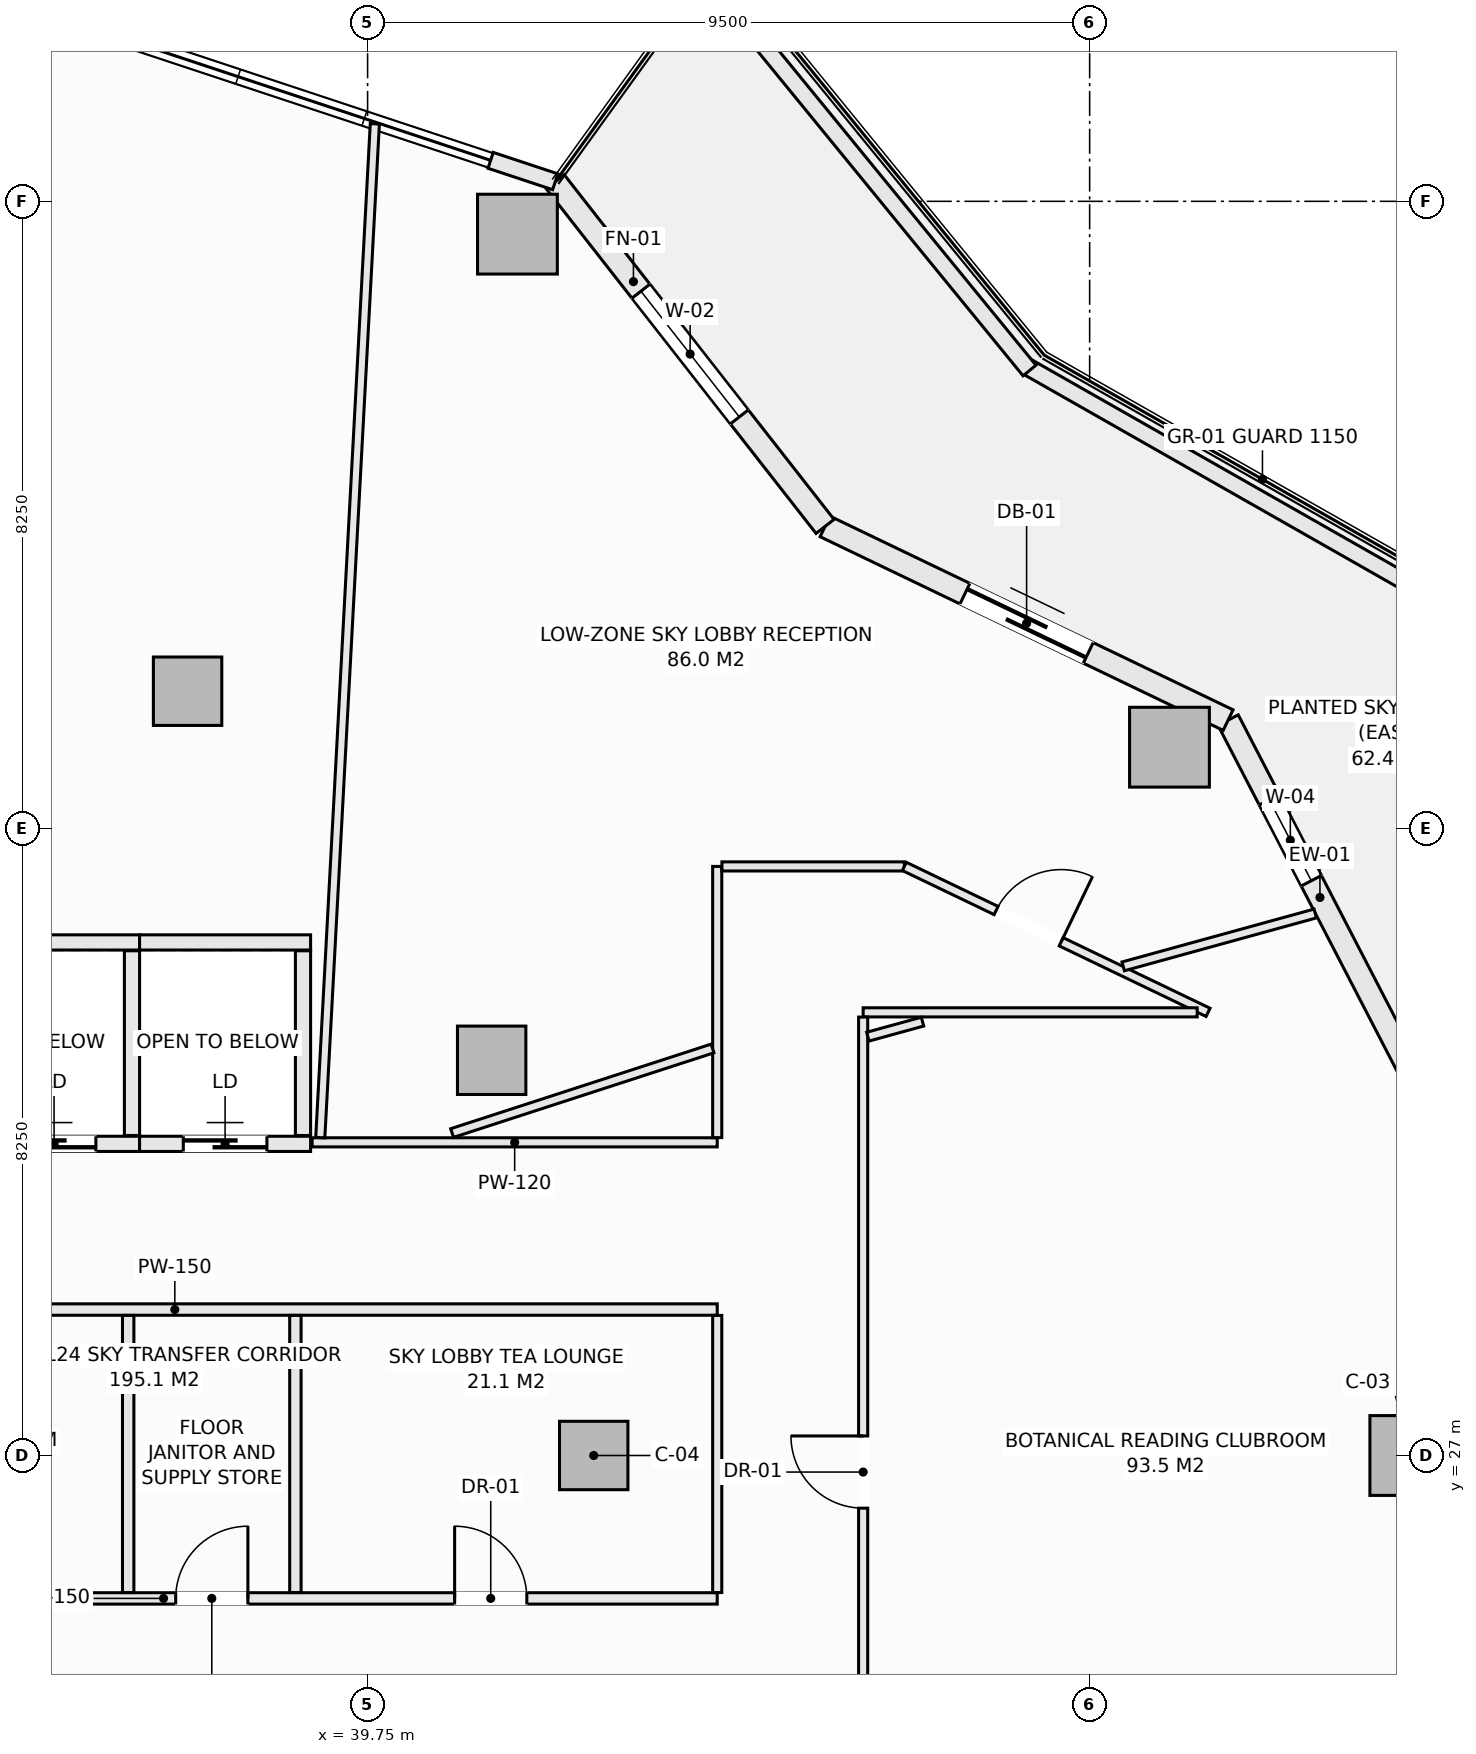
"""IFC4 building model, lengths in metres.
Left out: names, types, materials, properties, quantities, classifications, styles, units other than length and angle.
Written with IfcOpenShell. Run it as: python <this file> out.ifc"""

import sys

from ifc_helpers import new_model, si_unit, direction, frame, frame_2d, origin, origin_2d, place, context, subcontext, project, spatial, rectangle, extrude, element, fill, save


model = new_model("IFC4")
c1 = context("Model", 3, precision=1e-05, world=origin(), true_north=direction((0.0, 1.0)))
c2 = subcontext(c1, "Body", "Model", "MODEL_VIEW")
j1 = project(units=[si_unit("LENGTHUNIT", "METRE"), si_unit("PLANEANGLEUNIT", "RADIAN")], contexts=[c1])
p1 = place(None, origin())
s1 = spatial("IfcSite", under=j1, at=p1, CompositionType="ELEMENT")
p2 = place(p1, origin())
s2 = spatial("IfcBuilding", under=s1, at=p2, CompositionType="ELEMENT")
p3 = place(p2, frame((0.0, 0.0, 100.8)))
s3 = spatial("IfcBuildingStorey", under=s2, at=p3, CompositionType="ELEMENT", Elevation=100.8)
for number, where, z_axis, x_axis in (
    (1, (53.462, 27.0, -0.28), (0.0, 0.0, 1.0), (1.0, 0.0, 0.0)),
    (2, (50.3, 36.319, -0.28), (0.0, 0.0, 1.0), (1.0, 0.0, 0.0)),
    (3, (41.721, 43.068, -0.28), (0.0, 0.0, 1.0), (1.0, 0.0, 0.0)),
):
    element("IfcColumn", number, at=place(p3, frame(where, z_axis=z_axis, x_axis=x_axis)), inside=s3, PredefinedType="COLUMN", context=c2, shape_type="SweptSolid", body=[
        extrude(rectangle(XDim=1.05, YDim=1.05, at=origin_2d()), origin(), (0.0, 0.0, 1.0), 4.51),
    ])
for number, where, z_axis, x_axis in (
    (4, (42.725, 27.0, -0.28), (0.0, 0.0, 1.0), (1.0, 0.0, 0.0)),
    (5, (41.382, 32.199, -0.28), (0.0, 0.0, 1.0), (1.0, 0.0, 0.0)),
    (6, (37.382, 37.055, -0.28), (0.0, 0.0, 1.0), (1.0, 0.0, 0.0)),
):
    element("IfcColumn", number, at=place(p3, frame(where, z_axis=z_axis, x_axis=x_axis)), inside=s3, PredefinedType="COLUMN", context=c2, shape_type="SweptSolid", body=[
        extrude(rectangle(XDim=0.9, YDim=0.9, at=origin_2d()), origin(), (0.0, 0.0, 1.0), 4.51),
    ])
p4 = place(p3, frame((51.072, 36.675, 0.0), z_axis=(0.0, 0.0, 1.0), x_axis=(0.459767899643, -0.888039119892, 0.0)))
e7 = element("IfcWall", 7, at=p4, inside=s3, PredefinedType="SOLIDWALL", context=c2, shape_type="SweptSolid", body=[
    extrude(rectangle(XDim=5.255, YDim=0.3, at=frame_2d((2.628, 0.0))), origin(), (0.0, 0.0, 1.0), 3.753),
])
p5 = place(p4, frame((1.18, 0.0, 0.72)))
e8 = element("IfcOpeningElement", 8, at=p5, cuts=e7, PredefinedType="OPENING", context=c2, shape_type="SweptSolid", body=[
    extrude(rectangle(XDim=1.2, YDim=1.65, at=frame_2d((0.6, 0.825))), frame((0.0, 0.16, 0.0), z_axis=(0.0, -1.0, 0.0), x_axis=(1.0, 0.0, 0.0)), (0.0, 0.0, 1.0), 0.32),
])
p6 = place(p3, frame((45.769, 39.223, 0.0), z_axis=(0.0, 0.0, 1.0), x_axis=(0.901370184739, -0.433049408339, 0.0)))
e9 = element("IfcWall", 9, at=p6, inside=s3, PredefinedType="SOLIDWALL", context=c2, shape_type="SweptSolid", body=[
    extrude(rectangle(XDim=5.884, YDim=0.3, at=frame_2d((2.942, 0.0))), origin(), (0.0, 0.0, 1.0), 3.753),
])
p7 = place(p6, frame((2.042, 0.0, 0.0)))
e10 = element("IfcOpeningElement", 10, at=p7, cuts=e9, PredefinedType="OPENING", context=c2, shape_type="SweptSolid", body=[
    extrude(rectangle(XDim=1.8, YDim=2.25, at=frame_2d((0.9, 1.125))), frame((0.0, 0.16, 0.0), z_axis=(0.0, -1.0, 0.0), x_axis=(1.0, 0.0, 0.0)), (0.0, 0.0, 1.0), 0.32),
])
p8 = place(p3, frame((42.219, 43.758, 0.0), z_axis=(0.0, 0.0, 1.0), x_axis=(0.616435134162, -0.787405693001, 0.0)))
e11 = element("IfcWall", 11, at=p8, inside=s3, PredefinedType="SOLIDWALL", context=c2, shape_type="SweptSolid", body=[
    extrude(rectangle(XDim=5.759, YDim=0.3, at=frame_2d((2.879, 0.0))), origin(), (0.0, 0.0, 1.0), 3.753),
])
p9 = place(p8, frame((1.829, 0.0, 0.74)))
e12 = element("IfcOpeningElement", 12, at=p9, cuts=e11, PredefinedType="OPENING", context=c2, shape_type="SweptSolid", body=[
    extrude(rectangle(XDim=2.1, YDim=1.7, at=frame_2d((1.05, 0.85))), frame((0.0, 0.16, 0.0), z_axis=(0.0, -1.0, 0.0), x_axis=(1.0, 0.0, 0.0)), (0.0, 0.0, 1.0), 0.32),
])
p10 = place(p3, frame((41.369, 44.039, 0.0), z_axis=(0.0, 0.0, 1.0), x_axis=(0.949227107477, -0.314591637573, 0.0)))
e13 = element("IfcWall", 13, at=p10, inside=s3, PredefinedType="SOLIDWALL", context=c2, shape_type="SweptSolid", body=[
    extrude(rectangle(XDim=0.896, YDim=0.22, at=frame_2d((0.448, 0.0))), origin(), (0.0, 0.0, 1.0), 3.753),
])
p11 = place(p3, frame((48.413, 41.332, 0.0), z_axis=(0.0, 0.0, 1.0), x_axis=(0.869187658335, -0.494482370361, 0.0)))
e14 = element("IfcWall", 14, at=p11, inside=s3, PredefinedType="PARAPET", context=c2, shape_type="SweptSolid", body=[
    extrude(rectangle(XDim=6.606, YDim=0.22, at=frame_2d((3.303, 0.0))), origin(), (0.0, 0.0, 1.0), 0.52),
])
p12 = place(p3, frame((44.167, 46.523, 0.0), z_axis=(0.0, 0.0, 1.0), x_axis=(0.633002467947, -0.77414977593, 0.0)))
e15 = element("IfcWall", 15, at=p12, inside=s3, PredefinedType="PARAPET", context=c2, shape_type="SweptSolid", body=[
    extrude(rectangle(XDim=6.78, YDim=0.22, at=frame_2d((3.39, 0.0))), origin(), (0.0, 0.0, 1.0), 0.52),
])
p13 = place(p3, frame((34.5, 33.75, 0.0), z_axis=(0.0, 0.0, 1.0), x_axis=(1.0, 0.0, 0.0)))
e16 = element("IfcWall", 16, at=p13, inside=s3, PredefinedType="SOLIDWALL", context=c2, shape_type="SweptSolid", body=[
    extrude(rectangle(XDim=2.25, YDim=0.2, at=frame_2d((1.125, 0.0))), origin(), (0.0, 0.0, 1.0), 4.23),
])
p14 = place(p3, frame((34.5, 31.1, 0.0), z_axis=(0.0, 0.0, 1.0), x_axis=(1.0, 0.0, 0.0)))
e17 = element("IfcWall", 17, at=p14, inside=s3, PredefinedType="SOLIDWALL", context=c2, shape_type="SweptSolid", body=[
    extrude(rectangle(XDim=2.25, YDim=0.2, at=frame_2d((1.125, 0.0))), origin(), (0.0, 0.0, 1.0), 4.23),
])
p15 = place(p14, frame((0.575, 0.0, 0.0)))
e18 = element("IfcOpeningElement", 18, at=p15, cuts=e17, PredefinedType="OPENING", context=c2, shape_type="SweptSolid", body=[
    extrude(rectangle(XDim=1.1, YDim=2.2, at=frame_2d((0.55, 1.1))), frame((0.0, 0.11, 0.0), z_axis=(0.0, -1.0, 0.0), x_axis=(1.0, 0.0, 0.0)), (0.0, 0.0, 1.0), 0.22),
])
p16 = place(p3, frame((36.65, 31.21, 0.0), z_axis=(0.0, 0.0, 1.0), x_axis=(0.0, 1.0, 0.0)))
e19 = element("IfcWall", 19, at=p16, inside=s3, PredefinedType="SOLIDWALL", context=c2, shape_type="SweptSolid", body=[
    extrude(rectangle(XDim=2.43, YDim=0.2, at=frame_2d((1.215, 0.0))), origin(), (0.0, 0.0, 1.0), 4.23),
])
p17 = place(p3, frame((36.75, 33.75, 0.0), z_axis=(0.0, 0.0, 1.0), x_axis=(1.0, 0.0, 0.0)))
e20 = element("IfcWall", 20, at=p17, inside=s3, PredefinedType="SOLIDWALL", context=c2, shape_type="SweptSolid", body=[
    extrude(rectangle(XDim=2.25, YDim=0.2, at=frame_2d((1.125, 0.0))), origin(), (0.0, 0.0, 1.0), 4.23),
])
p18 = place(p3, frame((36.75, 31.1, 0.0), z_axis=(0.0, 0.0, 1.0), x_axis=(1.0, 0.0, 0.0)))
e21 = element("IfcWall", 21, at=p18, inside=s3, PredefinedType="SOLIDWALL", context=c2, shape_type="SweptSolid", body=[
    extrude(rectangle(XDim=2.25, YDim=0.2, at=frame_2d((1.125, 0.0))), origin(), (0.0, 0.0, 1.0), 4.23),
])
p19 = place(p18, frame((0.575, 0.0, 0.0)))
e22 = element("IfcOpeningElement", 22, at=p19, cuts=e21, PredefinedType="OPENING", context=c2, shape_type="SweptSolid", body=[
    extrude(rectangle(XDim=1.1, YDim=2.2, at=frame_2d((0.55, 1.1))), frame((0.0, 0.11, 0.0), z_axis=(0.0, -1.0, 0.0), x_axis=(1.0, 0.0, 0.0)), (0.0, 0.0, 1.0), 0.22),
])
p20 = place(p3, frame((38.9, 31.21, 0.0), z_axis=(0.0, 0.0, 1.0), x_axis=(0.0, 1.0, 0.0)))
e23 = element("IfcWall", 23, at=p20, inside=s3, PredefinedType="SOLIDWALL", context=c2, shape_type="SweptSolid", body=[
    extrude(rectangle(XDim=2.43, YDim=0.2, at=frame_2d((1.215, 0.0))), origin(), (0.0, 0.0, 1.0), 4.23),
])
p21 = place(p3, frame((29.78, 25.12, 0.0), z_axis=(0.0, 0.0, 1.0), x_axis=(1.0, 0.0, 0.0)))
e24 = element("IfcWall", 24, at=p21, inside=s3, PredefinedType="PARTITIONING", context=c2, shape_type="SweptSolid", body=[
    extrude(rectangle(XDim=14.57, YDim=0.15, at=frame_2d((7.285, 0.0))), origin(), (0.0, 0.0, 1.0), 4.23),
])
p22 = place(p21, frame((3.14, 0.0, 0.0)))
e25 = element("IfcOpeningElement", 25, at=p22, cuts=e24, PredefinedType="OPENING", context=c2, shape_type="SweptSolid", body=[
    extrude(rectangle(XDim=0.95, YDim=2.1, at=frame_2d((0.475, 1.05))), frame((0.0, 0.085, 0.0), z_axis=(0.0, -1.0, 0.0), x_axis=(1.0, 0.0, 0.0)), (0.0, 0.0, 1.0), 0.17),
])
p23 = place(p21, frame((7.445, 0.0, 0.0)))
e26 = element("IfcOpeningElement", 26, at=p23, cuts=e24, PredefinedType="OPENING", context=c2, shape_type="SweptSolid", body=[
    extrude(rectangle(XDim=0.95, YDim=2.1, at=frame_2d((0.475, 1.05))), frame((0.0, 0.085, 0.0), z_axis=(0.0, -1.0, 0.0), x_axis=(1.0, 0.0, 0.0)), (0.0, 0.0, 1.0), 0.17),
])
p24 = place(p21, frame((11.115, 0.0, 0.0)))
e27 = element("IfcOpeningElement", 27, at=p24, cuts=e24, PredefinedType="OPENING", context=c2, shape_type="SweptSolid", body=[
    extrude(rectangle(XDim=0.95, YDim=2.1, at=frame_2d((0.475, 1.05))), frame((0.0, 0.085, 0.0), z_axis=(0.0, -1.0, 0.0), x_axis=(1.0, 0.0, 0.0)), (0.0, 0.0, 1.0), 0.17),
])
p25 = place(p3, frame((30.077, 28.92, 0.0), z_axis=(0.0, 0.0, 1.0), x_axis=(1.0, 0.0, 0.0)))
e28 = element("IfcWall", 28, at=p25, inside=s3, PredefinedType="PARTITIONING", context=c2, shape_type="SweptSolid", body=[
    extrude(rectangle(XDim=14.273, YDim=0.15, at=frame_2d((7.137, 0.0))), origin(), (0.0, 0.0, 1.0), 4.23),
])
for number, where, z_axis, x_axis in (
    (29, (36.6, 25.197, 0.0), (0.0, 0.0, 1.0), (0.0, 1.0, 0.0)),
    (30, (38.8, 25.197, 0.0), (0.0, 0.0, 1.0), (0.0, 1.0, 0.0)),
):
    element("IfcWall", number, at=place(p3, frame(where, z_axis=z_axis, x_axis=x_axis)), inside=s3, PredefinedType="PARTITIONING", context=c2, shape_type="SweptSolid", body=[
        extrude(rectangle(XDim=3.646, YDim=0.15, at=frame_2d((1.823, 0.0))), origin(), (0.0, 0.0, 1.0), 4.23),
    ])
p26 = place(p3, frame((39.02, 31.12, 0.0), z_axis=(0.0, 0.0, 1.0), x_axis=(1.0, 0.0, 0.0)))
e31 = element("IfcWall", 31, at=p26, inside=s3, PredefinedType="PARTITIONING", context=c2, shape_type="SweptSolid", body=[
    extrude(rectangle(XDim=5.33, YDim=0.12, at=frame_2d((2.665, 0.0))), origin(), (0.0, 0.0, 1.0), 4.23),
])
p27 = place(p3, frame((44.35, 25.197, 0.0), z_axis=(0.0, 0.0, 1.0), x_axis=(0.0, 1.0, 0.0)))
e32 = element("IfcWall", 32, at=p27, inside=s3, PredefinedType="PARTITIONING", context=c2, shape_type="SweptSolid", body=[
    extrude(rectangle(XDim=3.646, YDim=0.12, at=frame_2d((1.823, 0.0))), origin(), (0.0, 0.0, 1.0), 4.23),
])
p28 = place(p3, frame((44.35, 31.182, 0.0), z_axis=(0.0, 0.0, 1.0), x_axis=(0.0, 1.0, 0.0)))
e33 = element("IfcWall", 33, at=p28, inside=s3, PredefinedType="PARTITIONING", context=c2, shape_type="SweptSolid", body=[
    extrude(rectangle(XDim=3.568, YDim=0.12, at=frame_2d((1.784, 0.0))), origin(), (0.0, 0.0, 1.0), 4.23),
])
p29 = place(p3, frame((44.412, 34.75, 0.0), z_axis=(0.0, 0.0, 1.0), x_axis=(1.0, 0.0, 0.0)))
e34 = element("IfcWall", 34, at=p29, inside=s3, PredefinedType="PARTITIONING", context=c2, shape_type="SweptSolid", body=[
    extrude(rectangle(XDim=2.4, YDim=0.12, at=frame_2d((1.2, 0.0))), origin(), (0.0, 0.0, 1.0), 3.912),
])
p30 = place(p3, frame((46.812, 34.75, 0.0), z_axis=(0.0, 0.0, 1.0), x_axis=(0.901364880585, -0.433060448492, 0.0)))
e35 = element("IfcWall", 35, at=p30, inside=s3, PredefinedType="PARTITIONING", context=c2, shape_type="SweptSolid", body=[
    extrude(rectangle(XDim=4.433, YDim=0.12, at=frame_2d((2.217, 0.0))), origin(), (0.0, 0.0, 1.0), 4.23),
])
p31 = place(p30, frame((1.34, 0.0, 0.0)))
e36 = element("IfcOpeningElement", 36, at=p31, cuts=e35, PredefinedType="OPENING", context=c2, shape_type="SweptSolid", body=[
    extrude(rectangle(XDim=0.95, YDim=2.1, at=frame_2d((0.475, 1.05))), frame((0.0, 0.07, 0.0), z_axis=(0.0, -1.0, 0.0), x_axis=(1.0, 0.0, 0.0)), (0.0, 0.0, 1.0), 0.14),
])
p32 = place(p3, frame((46.27, 32.83, 0.0), z_axis=(0.0, 0.0, 1.0), x_axis=(1.0, 0.0, 0.0)))
e37 = element("IfcWall", 37, at=p32, inside=s3, PredefinedType="PARTITIONING", context=c2, shape_type="SweptSolid", body=[
    extrude(rectangle(XDim=4.395, YDim=0.12, at=frame_2d((2.197, 0.0))), origin(), (0.0, 0.0, 1.0), 4.23),
])
p33 = place(p3, frame((46.27, 20.67, 0.0), z_axis=(0.0, 0.0, 1.0), x_axis=(0.0, 1.0, 0.0)))
e38 = element("IfcWall", 38, at=p33, inside=s3, PredefinedType="PARTITIONING", context=c2, shape_type="SweptSolid", body=[
    extrude(rectangle(XDim=12.098, YDim=0.12, at=frame_2d((6.049, 0.0))), origin(), (0.0, 0.0, 1.0), 4.23),
])
p34 = place(p33, frame((5.637, 0.0, 0.0)))
e39 = element("IfcOpeningElement", 39, at=p34, cuts=e38, PredefinedType="OPENING", context=c2, shape_type="SweptSolid", body=[
    extrude(rectangle(XDim=0.95, YDim=2.1, at=frame_2d((0.475, 1.05))), frame((0.0, 0.07, 0.0), z_axis=(0.0, -1.0, 0.0), x_axis=(1.0, 0.0, 0.0)), (0.0, 0.0, 1.0), 0.14),
])
p35 = place(p3, frame((46.332, 32.51, 0.0), z_axis=(0.0, 0.0, 1.0), x_axis=(0.964088084793, 0.265582689119, 0.0)))
e40 = element("IfcWall", 40, at=p35, inside=s3, PredefinedType="PARTITIONING", context=c2, shape_type="SweptSolid", body=[
    extrude(rectangle(XDim=0.746, YDim=0.12, at=frame_2d((0.373, 0.0))), origin(), (0.0, 0.0, 1.0), 4.23),
])
p36 = place(p3, frame((49.692, 33.435, 0.0), z_axis=(0.0, 0.0, 1.0), x_axis=(0.964126743029, 0.265442316476, 0.0)))
e41 = element("IfcWall", 41, at=p36, inside=s3, PredefinedType="PARTITIONING", context=c2, shape_type="SweptSolid", body=[
    extrude(rectangle(XDim=2.62, YDim=0.12, at=frame_2d((1.31, 0.0))), origin(), (0.0, 0.0, 1.0), 4.23),
])
p37 = place(p3, frame((40.862, 31.242, 0.0), z_axis=(0.0, 0.0, 1.0), x_axis=(0.951081366657, 0.308940502358, 0.0)))
e42 = element("IfcWall", 42, at=p37, inside=s3, PredefinedType="PARTITIONING", context=c2, shape_type="SweptSolid", body=[
    extrude(rectangle(XDim=3.603, YDim=0.12, at=frame_2d((1.801, 0.0))), origin(), (0.0, 0.0, 1.0), 4.23),
])
p38 = place(p3, frame((39.127, 31.182, 0.0), z_axis=(0.0, 0.0, 1.0), x_axis=(0.053754103035, 0.998554203039, 0.0)))
e43 = element("IfcWall", 43, at=p38, inside=s3, PredefinedType="PARTITIONING", context=c2, shape_type="SweptSolid", body=[
    extrude(rectangle(XDim=13.357, YDim=0.12, at=frame_2d((6.679, 0.0))), origin(), (0.0, 0.0, 1.0), 3.605),
])
p39 = place(p5, origin())
e44 = element("IfcWindow", 44, at=p39, inside=s3, PartitioningType="SINGLE_PANEL", PredefinedType="WINDOW", context=c2, shape_type="SweptSolid", body=[
    extrude(rectangle(XDim=1.2, YDim=1.65, at=frame_2d((0.6, 0.825))), frame((0.0, 0.03, 0.0), z_axis=(0.0, -1.0, 0.0), x_axis=(1.0, 0.0, 0.0)), (0.0, 0.0, 1.0), 0.06),
])
fill(e8, e44)
p40 = place(p7, origin())
e45 = element("IfcDoor", 45, at=p40, inside=s3, OperationType="SLIDING_TO_LEFT", PredefinedType="DOOR", context=c2, shape_type="SweptSolid", body=[
    extrude(rectangle(XDim=1.8, YDim=2.25, at=frame_2d((0.9, 1.125))), frame((0.0, 0.025, 0.0), z_axis=(0.0, -1.0, 0.0), x_axis=(1.0, 0.0, 0.0)), (0.0, 0.0, 1.0), 0.05),
])
fill(e10, e45)
p41 = place(p9, origin())
e46 = element("IfcWindow", 46, at=p41, inside=s3, PartitioningType="SINGLE_PANEL", PredefinedType="WINDOW", context=c2, shape_type="SweptSolid", body=[
    extrude(rectangle(XDim=2.1, YDim=1.7, at=frame_2d((1.05, 0.85))), frame((0.0, 0.03, 0.0), z_axis=(0.0, -1.0, 0.0), x_axis=(1.0, 0.0, 0.0)), (0.0, 0.0, 1.0), 0.06),
])
fill(e12, e46)
p42 = place(p15, origin())
e47 = element("IfcDoor", 47, at=p42, inside=s3, OperationType="SLIDING_TO_LEFT", PredefinedType="DOOR", context=c2, shape_type="SweptSolid", body=[
    extrude(rectangle(XDim=1.1, YDim=2.2, at=frame_2d((0.55, 1.1))), frame((0.0, 0.025, 0.0), z_axis=(0.0, -1.0, 0.0), x_axis=(1.0, 0.0, 0.0)), (0.0, 0.0, 1.0), 0.05),
])
fill(e18, e47)
p43 = place(p19, origin())
e48 = element("IfcDoor", 48, at=p43, inside=s3, OperationType="SLIDING_TO_LEFT", PredefinedType="DOOR", context=c2, shape_type="SweptSolid", body=[
    extrude(rectangle(XDim=1.1, YDim=2.2, at=frame_2d((0.55, 1.1))), frame((0.0, 0.025, 0.0), z_axis=(0.0, -1.0, 0.0), x_axis=(1.0, 0.0, 0.0)), (0.0, 0.0, 1.0), 0.05),
])
fill(e22, e48)
p44 = place(p23, origin())
e49 = element("IfcDoor", 49, at=p44, inside=s3, OperationType="SINGLE_SWING_RIGHT", PredefinedType="DOOR", context=c2, shape_type="SweptSolid", body=[
    extrude(rectangle(XDim=0.95, YDim=2.1, at=frame_2d((0.475, 1.05))), frame((0.0, 0.025, 0.0), z_axis=(0.0, -1.0, 0.0), x_axis=(1.0, 0.0, 0.0)), (0.0, 0.0, 1.0), 0.05),
])
fill(e26, e49)
p45 = place(p34, origin())
e50 = element("IfcDoor", 50, at=p45, inside=s3, OperationType="SINGLE_SWING_RIGHT", PredefinedType="DOOR", context=c2, shape_type="SweptSolid", body=[
    extrude(rectangle(XDim=0.95, YDim=2.1, at=frame_2d((0.475, 1.05))), frame((0.0, 0.025, 0.0), z_axis=(0.0, -1.0, 0.0), x_axis=(1.0, 0.0, 0.0)), (0.0, 0.0, 1.0), 0.05),
])
fill(e39, e50)
p46 = place(p24, origin())
e51 = element("IfcDoor", 51, at=p46, inside=s3, OperationType="SINGLE_SWING_LEFT", PredefinedType="DOOR", context=c2, shape_type="SweptSolid", body=[
    extrude(rectangle(XDim=0.95, YDim=2.1, at=frame_2d((0.475, 1.05))), frame((0.0, 0.025, 0.0), z_axis=(0.0, -1.0, 0.0), x_axis=(1.0, 0.0, 0.0)), (0.0, 0.0, 1.0), 0.05),
])
fill(e27, e51)
p47 = place(p31, origin())
e52 = element("IfcDoor", 52, at=p47, inside=s3, OperationType="SINGLE_SWING_RIGHT", PredefinedType="DOOR", context=c2, shape_type="SweptSolid", body=[
    extrude(rectangle(XDim=0.95, YDim=2.1, at=frame_2d((0.475, 1.05))), frame((0.0, 0.025, 0.0), z_axis=(0.0, -1.0, 0.0), x_axis=(1.0, 0.0, 0.0)), (0.0, 0.0, 1.0), 0.05),
])
fill(e36, e52)
save(model, sys.argv[1])
